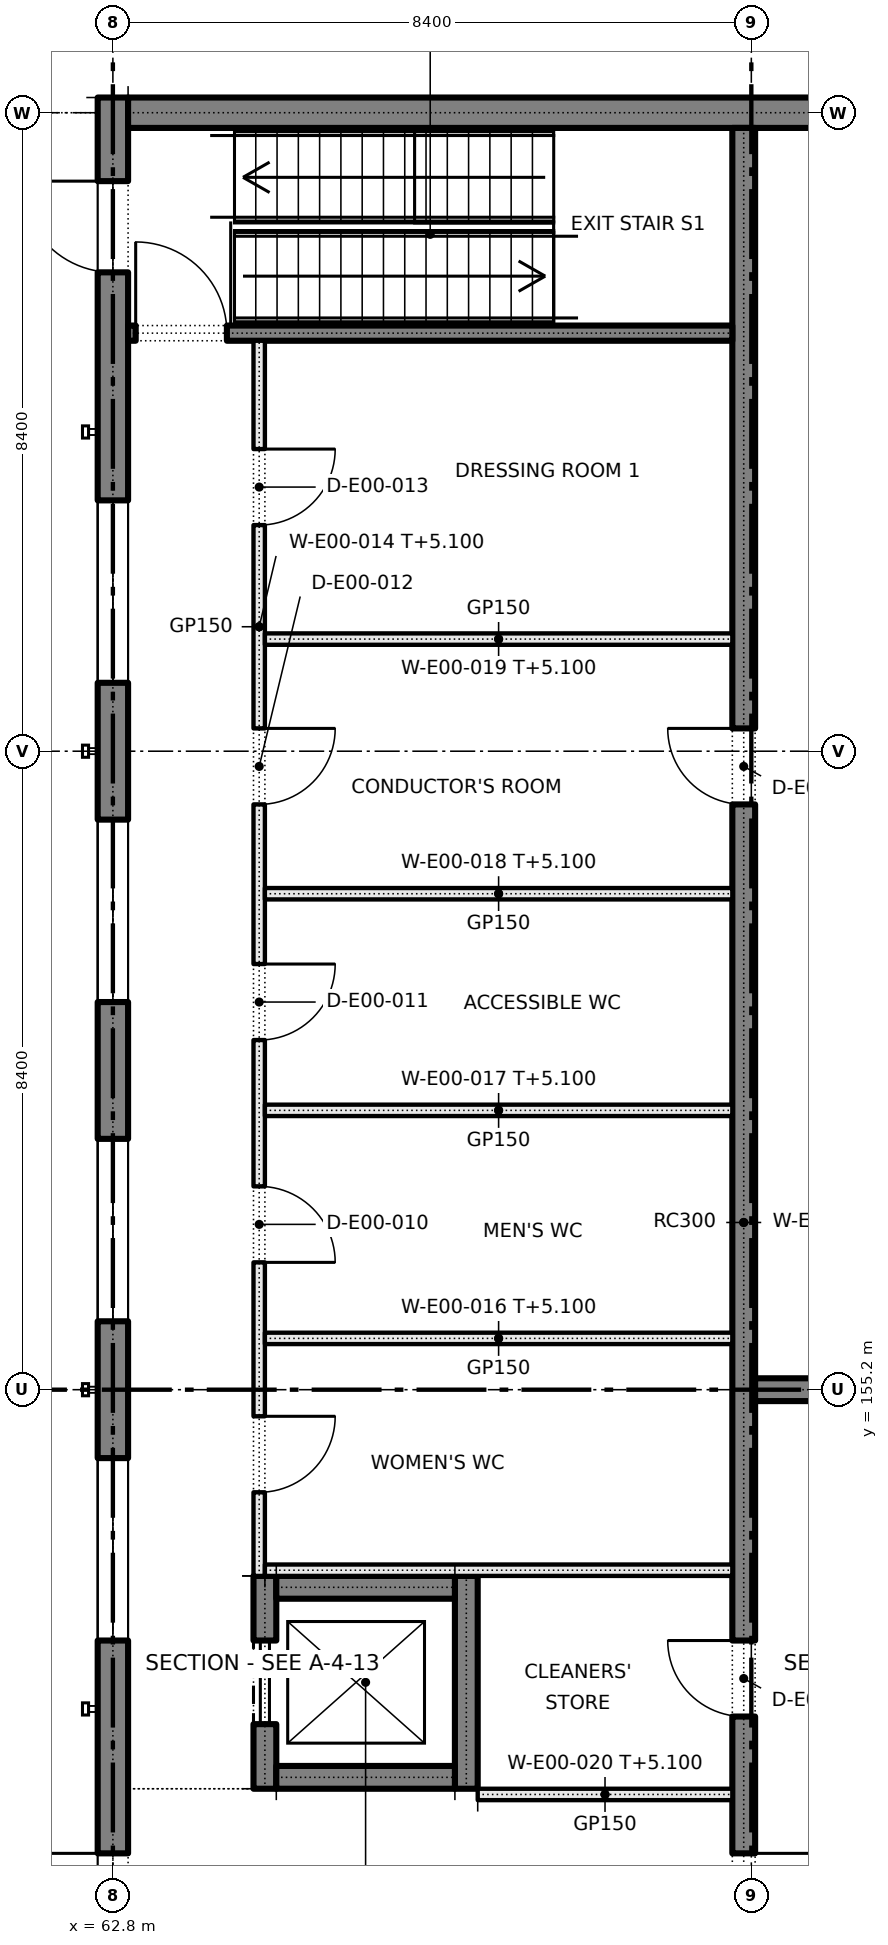
"""IFC4 building model, lengths in metres.
Left out: names, types, materials, properties, quantities, classifications, styles, units other than length and angle.
Written with IfcOpenShell. Run it as: python <this file> out.ifc"""

import sys

from ifc_helpers import new_model, si_unit, direction, frame, frame_2d, origin, place, context, subcontext, project, spatial, rectangle, extrude, element, fill, save


model = new_model("IFC4")
c1 = context("Model", 3, precision=1e-05, world=origin(), true_north=direction((0.0, 1.0)))
c2 = subcontext(c1, "Body", "Model", "MODEL_VIEW")
j1 = project(units=[si_unit("LENGTHUNIT", "METRE"), si_unit("PLANEANGLEUNIT", "RADIAN")], contexts=[c1])
p1 = place(None, origin())
s1 = spatial("IfcSite", under=j1, at=p1, CompositionType="ELEMENT")
p2 = place(p1, origin())
s2 = spatial("IfcBuilding", under=s1, at=p2, CompositionType="ELEMENT")
p3 = place(p2, origin())
s3 = spatial("IfcBuildingStorey", under=s2, at=p3, CompositionType="ELEMENT", Elevation=0.0)
p4 = place(p3, frame((62.8, 146.6, 0.0), z_axis=(0.0, 0.0, 1.0), x_axis=(0.0, 1.0, 0.0)))
e1 = element("IfcWall", 1, at=p4, inside=s3, PredefinedType="SOLIDWALL", context=c2, shape_type="SweptSolid", body=[
    extrude(rectangle(XDim=25.6, YDim=0.4, at=frame_2d((12.8, 0.0))), origin(), (0.0, 0.0, 1.0), 5.4),
])
p5 = place(p4, frame((23.3, 0.0, 0.0)))
e2 = element("IfcOpeningElement", 2, at=p5, cuts=e1, PredefinedType="OPENING", context=c2, shape_type="SweptSolid", body=[
    extrude(rectangle(XDim=1.2, YDim=2.1, at=frame_2d((0.6, 1.05))), frame((0.0, 0.21, 0.0), z_axis=(0.0, -1.0, 0.0), x_axis=(1.0, 0.0, 0.0)), (0.0, 0.0, 1.0), 0.42),
])
p6 = place(p4, frame((1.3, 0.0, 0.0)))
e3 = element("IfcOpeningElement", 3, at=p6, cuts=e1, PredefinedType="OPENING", context=c2, shape_type="SweptSolid", body=[
    extrude(rectangle(XDim=1.2, YDim=2.1, at=frame_2d((0.6, 1.05))), frame((0.0, 0.21, 0.0), z_axis=(0.0, -1.0, 0.0), x_axis=(1.0, 0.0, 0.0)), (0.0, 0.0, 1.0), 0.42),
])
p7 = place(p4, frame((5.3, 0.0, 0.9)))
e4 = element("IfcOpeningElement", 4, at=p7, cuts=e1, PredefinedType="OPENING", context=c2, shape_type="SweptSolid", body=[
    extrude(rectangle(XDim=2.4, YDim=2.4, at=frame_2d((1.2, 1.2))), frame((0.0, 0.21, 0.0), z_axis=(0.0, -1.0, 0.0), x_axis=(1.0, 0.0, 0.0)), (0.0, 0.0, 1.0), 0.42),
])
p8 = place(p4, frame((9.5, 0.0, 0.9)))
e5 = element("IfcOpeningElement", 5, at=p8, cuts=e1, PredefinedType="OPENING", context=c2, shape_type="SweptSolid", body=[
    extrude(rectangle(XDim=2.4, YDim=2.4, at=frame_2d((1.2, 1.2))), frame((0.0, 0.21, 0.0), z_axis=(0.0, -1.0, 0.0), x_axis=(1.0, 0.0, 0.0)), (0.0, 0.0, 1.0), 0.42),
])
p9 = place(p4, frame((13.7, 0.0, 0.9)))
e6 = element("IfcOpeningElement", 6, at=p9, cuts=e1, PredefinedType="OPENING", context=c2, shape_type="SweptSolid", body=[
    extrude(rectangle(XDim=2.4, YDim=2.4, at=frame_2d((1.2, 1.2))), frame((0.0, 0.21, 0.0), z_axis=(0.0, -1.0, 0.0), x_axis=(1.0, 0.0, 0.0)), (0.0, 0.0, 1.0), 0.42),
])
p10 = place(p4, frame((17.9, 0.0, 0.9)))
e7 = element("IfcOpeningElement", 7, at=p10, cuts=e1, PredefinedType="OPENING", context=c2, shape_type="SweptSolid", body=[
    extrude(rectangle(XDim=2.4, YDim=2.4, at=frame_2d((1.2, 1.2))), frame((0.0, 0.21, 0.0), z_axis=(0.0, -1.0, 0.0), x_axis=(1.0, 0.0, 0.0)), (0.0, 0.0, 1.0), 0.42),
])
p11 = place(p3, frame((63.0, 172.0, 0.0), z_axis=(0.0, 0.0, 1.0), x_axis=(1.0, 0.0, 0.0)))
e8 = element("IfcWall", 8, at=p11, inside=s3, PredefinedType="SOLIDWALL", context=c2, shape_type="SweptSolid", body=[
    extrude(rectangle(XDim=24.8, YDim=0.4, at=frame_2d((12.4, 0.0))), origin(), (0.0, 0.0, 1.0), 5.4),
])
p12 = place(p11, frame((9.1, 0.0, 0.9)))
e9 = element("IfcOpeningElement", 9, at=p12, cuts=e8, PredefinedType="OPENING", context=c2, shape_type="SweptSolid", body=[
    extrude(rectangle(XDim=2.4, YDim=2.4, at=frame_2d((1.2, 1.2))), frame((0.0, 0.21, 0.0), z_axis=(0.0, -1.0, 0.0), x_axis=(1.0, 0.0, 0.0)), (0.0, 0.0, 1.0), 0.42),
])
p13 = place(p11, frame((13.3, 0.0, 0.9)))
e10 = element("IfcOpeningElement", 10, at=p13, cuts=e8, PredefinedType="OPENING", context=c2, shape_type="SweptSolid", body=[
    extrude(rectangle(XDim=2.4, YDim=2.4, at=frame_2d((1.2, 1.2))), frame((0.0, 0.21, 0.0), z_axis=(0.0, -1.0, 0.0), x_axis=(1.0, 0.0, 0.0)), (0.0, 0.0, 1.0), 0.42),
])
p14 = place(p11, frame((17.5, 0.0, 0.9)))
e11 = element("IfcOpeningElement", 11, at=p14, cuts=e8, PredefinedType="OPENING", context=c2, shape_type="SweptSolid", body=[
    extrude(rectangle(XDim=2.4, YDim=2.4, at=frame_2d((1.2, 1.2))), frame((0.0, 0.21, 0.0), z_axis=(0.0, -1.0, 0.0), x_axis=(1.0, 0.0, 0.0)), (0.0, 0.0, 1.0), 0.42),
])
p15 = place(p11, frame((21.7, 0.0, 0.9)))
e12 = element("IfcOpeningElement", 12, at=p15, cuts=e8, PredefinedType="OPENING", context=c2, shape_type="SweptSolid", body=[
    extrude(rectangle(XDim=2.4, YDim=2.4, at=frame_2d((1.2, 1.2))), frame((0.0, 0.21, 0.0), z_axis=(0.0, -1.0, 0.0), x_axis=(1.0, 0.0, 0.0)), (0.0, 0.0, 1.0), 0.42),
])
p16 = place(p3, frame((71.1, 147.0, 0.0), z_axis=(0.0, 0.0, 1.0), x_axis=(0.0, 1.0, 0.0)))
e13 = element("IfcWall", 13, at=p16, inside=s3, PredefinedType="SOLIDWALL", context=c2, shape_type="SweptSolid", body=[
    extrude(rectangle(XDim=24.8, YDim=0.3, at=frame_2d((12.4, 0.0))), origin(), (0.0, 0.0, 1.0), 5.4),
])
p17 = place(p16, frame((0.9, 0.0, 0.0)))
e14 = element("IfcOpeningElement", 14, at=p17, cuts=e13, PredefinedType="OPENING", context=c2, shape_type="SweptSolid", body=[
    extrude(rectangle(XDim=1.2, YDim=2.1, at=frame_2d((0.6, 1.05))), frame((0.0, 0.16, 0.0), z_axis=(0.0, -1.0, 0.0), x_axis=(1.0, 0.0, 0.0)), (0.0, 0.0, 1.0), 0.32),
])
p18 = place(p16, frame((3.9, 0.0, 0.0)))
e15 = element("IfcOpeningElement", 15, at=p18, cuts=e13, PredefinedType="OPENING", context=c2, shape_type="SweptSolid", body=[
    extrude(rectangle(XDim=1.0, YDim=2.1, at=frame_2d((0.5, 1.05))), frame((0.0, 0.16, 0.0), z_axis=(0.0, -1.0, 0.0), x_axis=(1.0, 0.0, 0.0)), (0.0, 0.0, 1.0), 0.32),
])
p19 = place(p16, frame((15.9, 0.0, 0.0)))
e16 = element("IfcOpeningElement", 16, at=p19, cuts=e13, PredefinedType="OPENING", context=c2, shape_type="SweptSolid", body=[
    extrude(rectangle(XDim=1.0, YDim=2.1, at=frame_2d((0.5, 1.05))), frame((0.0, 0.16, 0.0), z_axis=(0.0, -1.0, 0.0), x_axis=(1.0, 0.0, 0.0)), (0.0, 0.0, 1.0), 0.32),
])
p20 = place(p3, frame((71.25, 155.2, 0.0), z_axis=(0.0, 0.0, 1.0), x_axis=(1.0, 0.0, 0.0)))
e17 = element("IfcWall", 17, at=p20, inside=s3, PredefinedType="SOLIDWALL", context=c2, shape_type="SweptSolid", body=[
    extrude(rectangle(XDim=16.55, YDim=0.3, at=frame_2d((8.275, 0.0))), origin(), (0.0, 0.0, 1.0), 5.4),
])
p21 = place(p20, frame((2.95, 0.0, 0.0)))
e18 = element("IfcOpeningElement", 18, at=p21, cuts=e17, PredefinedType="OPENING", context=c2, shape_type="SweptSolid", body=[
    extrude(rectangle(XDim=2.4, YDim=2.1, at=frame_2d((1.2, 1.05))), frame((0.0, 0.16, 0.0), z_axis=(0.0, -1.0, 0.0), x_axis=(1.0, 0.0, 0.0)), (0.0, 0.0, 1.0), 0.32),
])
p22 = place(p20, frame((9.85, 0.0, 0.0)))
e19 = element("IfcOpeningElement", 19, at=p22, cuts=e17, PredefinedType="OPENING", context=c2, shape_type="SweptSolid", body=[
    extrude(rectangle(XDim=2.4, YDim=2.1, at=frame_2d((1.2, 1.05))), frame((0.0, 0.16, 0.0), z_axis=(0.0, -1.0, 0.0), x_axis=(1.0, 0.0, 0.0)), (0.0, 0.0, 1.0), 0.32),
])
p23 = place(p3, frame((63.0, 169.1, 0.0), z_axis=(0.0, 0.0, 1.0), x_axis=(1.0, 0.0, 0.0)))
e20 = element("IfcWall", 20, at=p23, inside=s3, PredefinedType="SOLIDWALL", context=c2, shape_type="SweptSolid", body=[
    extrude(rectangle(XDim=7.95, YDim=0.2, at=frame_2d((3.975, 0.0))), origin(), (0.0, 0.0, 1.0), 5.4),
])
p24 = place(p23, frame((0.1, 0.0, 0.0)))
e21 = element("IfcOpeningElement", 21, at=p24, cuts=e20, PredefinedType="OPENING", context=c2, shape_type="SweptSolid", body=[
    extrude(rectangle(XDim=1.2, YDim=2.1, at=frame_2d((0.6, 1.05))), frame((0.0, 0.11, 0.0), z_axis=(0.0, -1.0, 0.0), x_axis=(1.0, 0.0, 0.0)), (0.0, 0.0, 1.0), 0.22),
])
p25 = place(p3, frame((64.8, 149.95, 0.0), z_axis=(0.0, 0.0, 1.0), x_axis=(0.0, 1.0, 0.0)))
e22 = element("IfcWall", 22, at=p25, inside=s3, PredefinedType="SOLIDWALL", context=c2, shape_type="SweptSolid", body=[
    extrude(rectangle(XDim=2.8, YDim=0.3, at=frame_2d((1.4, 0.0))), origin(), (0.0, 0.0, 1.0), 5.4),
])
p26 = place(p25, frame((0.85, 0.0, 0.0)))
e23 = element("IfcOpeningElement", 23, at=p26, cuts=e22, PredefinedType="OPENING", context=c2, shape_type="SweptSolid", body=[
    extrude(rectangle(XDim=1.1, YDim=2.1, at=frame_2d((0.55, 1.05))), frame((0.0, 0.16, 0.0), z_axis=(0.0, -1.0, 0.0), x_axis=(1.0, 0.0, 0.0)), (0.0, 0.0, 1.0), 0.32),
])
p27 = place(p3, frame((67.45, 149.95, 0.0), z_axis=(0.0, 0.0, 1.0), x_axis=(0.0, 1.0, 0.0)))
e24 = element("IfcWall", 24, at=p27, inside=s3, PredefinedType="SOLIDWALL", context=c2, shape_type="SweptSolid", body=[
    extrude(rectangle(XDim=2.8, YDim=0.3, at=frame_2d((1.4, 0.0))), origin(), (0.0, 0.0, 1.0), 5.4),
])
for number, where, z_axis, x_axis in (
    (25, (64.95, 150.1, 0.0), (0.0, 0.0, 1.0), (1.0, 0.0, 0.0)),
    (26, (64.95, 152.6, 0.0), (0.0, 0.0, 1.0), (1.0, 0.0, 0.0)),
):
    element("IfcWall", number, at=place(p3, frame(where, z_axis=z_axis, x_axis=x_axis)), inside=s3, PredefinedType="SOLIDWALL", context=c2, shape_type="SweptSolid", body=[
        extrude(rectangle(XDim=2.35, YDim=0.3, at=frame_2d((1.175, 0.0))), origin(), (0.0, 0.0, 1.0), 5.4),
    ])
p28 = place(p3, frame((64.725, 152.75, 0.0), z_axis=(0.0, 0.0, 1.0), x_axis=(0.0, 1.0, 0.0)))
e27 = element("IfcWall", 27, at=p28, inside=s3, PredefinedType="PARTITIONING", context=c2, shape_type="SweptSolid", body=[
    extrude(rectangle(XDim=16.25, YDim=0.15, at=frame_2d((8.125, 0.0))), origin(), (0.0, 0.0, 1.0), 5.1),
])
p29 = place(p28, frame((1.1, 0.0, 0.0)))
e28 = element("IfcOpeningElement", 28, at=p29, cuts=e27, PredefinedType="OPENING", context=c2, shape_type="SweptSolid", body=[
    extrude(rectangle(XDim=1.0, YDim=2.1, at=frame_2d((0.5, 1.05))), frame((0.0, 0.085, 0.0), z_axis=(0.0, -1.0, 0.0), x_axis=(1.0, 0.0, 0.0)), (0.0, 0.0, 1.0), 0.17),
])
p30 = place(p28, frame((4.125, 0.0, 0.0)))
e29 = element("IfcOpeningElement", 29, at=p30, cuts=e27, PredefinedType="OPENING", context=c2, shape_type="SweptSolid", body=[
    extrude(rectangle(XDim=1.0, YDim=2.1, at=frame_2d((0.5, 1.05))), frame((0.0, 0.085, 0.0), z_axis=(0.0, -1.0, 0.0), x_axis=(1.0, 0.0, 0.0)), (0.0, 0.0, 1.0), 0.17),
])
p31 = place(p28, frame((7.05, 0.0, 0.0)))
e30 = element("IfcOpeningElement", 30, at=p31, cuts=e27, PredefinedType="OPENING", context=c2, shape_type="SweptSolid", body=[
    extrude(rectangle(XDim=1.0, YDim=2.1, at=frame_2d((0.5, 1.05))), frame((0.0, 0.085, 0.0), z_axis=(0.0, -1.0, 0.0), x_axis=(1.0, 0.0, 0.0)), (0.0, 0.0, 1.0), 0.17),
])
p32 = place(p28, frame((10.15, 0.0, 0.0)))
e31 = element("IfcOpeningElement", 31, at=p32, cuts=e27, PredefinedType="OPENING", context=c2, shape_type="SweptSolid", body=[
    extrude(rectangle(XDim=1.0, YDim=2.1, at=frame_2d((0.5, 1.05))), frame((0.0, 0.085, 0.0), z_axis=(0.0, -1.0, 0.0), x_axis=(1.0, 0.0, 0.0)), (0.0, 0.0, 1.0), 0.17),
])
p33 = place(p28, frame((13.825, 0.0, 0.0)))
e32 = element("IfcOpeningElement", 32, at=p33, cuts=e27, PredefinedType="OPENING", context=c2, shape_type="SweptSolid", body=[
    extrude(rectangle(XDim=1.0, YDim=2.1, at=frame_2d((0.5, 1.05))), frame((0.0, 0.085, 0.0), z_axis=(0.0, -1.0, 0.0), x_axis=(1.0, 0.0, 0.0)), (0.0, 0.0, 1.0), 0.17),
])
for number, where, z_axis, x_axis in (
    (33, (64.8, 152.825, 0.0), (0.0, 0.0, 1.0), (1.0, 0.0, 0.0)),
    (34, (64.8, 155.875, 0.0), (0.0, 0.0, 1.0), (1.0, 0.0, 0.0)),
    (35, (64.8, 158.875, 0.0), (0.0, 0.0, 1.0), (1.0, 0.0, 0.0)),
    (36, (64.8, 161.725, 0.0), (0.0, 0.0, 1.0), (1.0, 0.0, 0.0)),
    (37, (64.8, 165.075, 0.0), (0.0, 0.0, 1.0), (1.0, 0.0, 0.0)),
):
    element("IfcWall", number, at=place(p3, frame(where, z_axis=z_axis, x_axis=x_axis)), inside=s3, PredefinedType="PARTITIONING", context=c2, shape_type="SweptSolid", body=[
        extrude(rectangle(XDim=6.15, YDim=0.15, at=frame_2d((3.075, 0.0))), origin(), (0.0, 0.0, 1.0), 5.1),
    ])
p34 = place(p3, frame((67.6, 149.875, 0.0), z_axis=(0.0, 0.0, 1.0), x_axis=(1.0, 0.0, 0.0)))
e38 = element("IfcWall", 38, at=p34, inside=s3, PredefinedType="PARTITIONING", context=c2, shape_type="SweptSolid", body=[
    extrude(rectangle(XDim=3.35, YDim=0.15, at=frame_2d((1.675, 0.0))), origin(), (0.0, 0.0, 1.0), 5.1),
])
p35 = place(p26, origin())
e39 = element("IfcDoor", 39, at=p35, inside=s3, OperationType="SLIDING_TO_LEFT", PredefinedType="DOOR", context=c2, shape_type="SweptSolid", body=[
    extrude(rectangle(XDim=1.1, YDim=2.1, at=frame_2d((0.55, 1.05))), frame((0.0, 0.025, 0.0), z_axis=(0.0, -1.0, 0.0), x_axis=(1.0, 0.0, 0.0)), (0.0, 0.0, 1.0), 0.05),
])
fill(e23, e39)
p36 = place(p5, origin())
e40 = element("IfcDoor", 40, at=p36, inside=s3, OperationType="SINGLE_SWING_RIGHT", PredefinedType="DOOR", context=c2, shape_type="SweptSolid", body=[
    extrude(rectangle(XDim=1.2, YDim=2.1, at=frame_2d((0.6, 1.05))), frame((0.0, 0.025, 0.0), z_axis=(0.0, -1.0, 0.0), x_axis=(1.0, 0.0, 0.0)), (0.0, 0.0, 1.0), 0.05),
])
fill(e2, e40)
p37 = place(p6, origin())
e41 = element("IfcDoor", 41, at=p37, inside=s3, OperationType="SINGLE_SWING_RIGHT", PredefinedType="DOOR", context=c2, shape_type="SweptSolid", body=[
    extrude(rectangle(XDim=1.2, YDim=2.1, at=frame_2d((0.6, 1.05))), frame((0.0, 0.025, 0.0), z_axis=(0.0, -1.0, 0.0), x_axis=(1.0, 0.0, 0.0)), (0.0, 0.0, 1.0), 0.05),
])
fill(e3, e41)
p38 = place(p7, origin())
e42 = element("IfcWindow", 42, at=p38, inside=s3, PartitioningType="SINGLE_PANEL", PredefinedType="WINDOW", context=c2, shape_type="SweptSolid", body=[
    extrude(rectangle(XDim=2.4, YDim=2.4, at=frame_2d((1.2, 1.2))), frame((0.0, 0.03, 0.0), z_axis=(0.0, -1.0, 0.0), x_axis=(1.0, 0.0, 0.0)), (0.0, 0.0, 1.0), 0.06),
])
fill(e4, e42)
p39 = place(p8, origin())
e43 = element("IfcWindow", 43, at=p39, inside=s3, PartitioningType="SINGLE_PANEL", PredefinedType="WINDOW", context=c2, shape_type="SweptSolid", body=[
    extrude(rectangle(XDim=2.4, YDim=2.4, at=frame_2d((1.2, 1.2))), frame((0.0, 0.03, 0.0), z_axis=(0.0, -1.0, 0.0), x_axis=(1.0, 0.0, 0.0)), (0.0, 0.0, 1.0), 0.06),
])
fill(e5, e43)
p40 = place(p9, origin())
e44 = element("IfcWindow", 44, at=p40, inside=s3, PartitioningType="SINGLE_PANEL", PredefinedType="WINDOW", context=c2, shape_type="SweptSolid", body=[
    extrude(rectangle(XDim=2.4, YDim=2.4, at=frame_2d((1.2, 1.2))), frame((0.0, 0.03, 0.0), z_axis=(0.0, -1.0, 0.0), x_axis=(1.0, 0.0, 0.0)), (0.0, 0.0, 1.0), 0.06),
])
fill(e6, e44)
p41 = place(p10, origin())
e45 = element("IfcWindow", 45, at=p41, inside=s3, PartitioningType="SINGLE_PANEL", PredefinedType="WINDOW", context=c2, shape_type="SweptSolid", body=[
    extrude(rectangle(XDim=2.4, YDim=2.4, at=frame_2d((1.2, 1.2))), frame((0.0, 0.03, 0.0), z_axis=(0.0, -1.0, 0.0), x_axis=(1.0, 0.0, 0.0)), (0.0, 0.0, 1.0), 0.06),
])
fill(e7, e45)
p42 = place(p29, frame((1.0, 0.0, 0.0), z_axis=(0.0, 0.0, 1.0), x_axis=(-1.0, 0.0, 0.0)))
e46 = element("IfcDoor", 46, at=p42, inside=s3, OperationType="SINGLE_SWING_LEFT", PredefinedType="DOOR", context=c2, shape_type="SweptSolid", body=[
    extrude(rectangle(XDim=1.0, YDim=2.1, at=frame_2d((0.5, 1.05))), frame((0.0, 0.025, 0.0), z_axis=(0.0, -1.0, 0.0), x_axis=(1.0, 0.0, 0.0)), (0.0, 0.0, 1.0), 0.05),
])
fill(e28, e46)
p43 = place(p30, frame((1.0, 0.0, 0.0), z_axis=(0.0, 0.0, 1.0), x_axis=(-1.0, 0.0, 0.0)))
e47 = element("IfcDoor", 47, at=p43, inside=s3, OperationType="SINGLE_SWING_RIGHT", PredefinedType="DOOR", context=c2, shape_type="SweptSolid", body=[
    extrude(rectangle(XDim=1.0, YDim=2.1, at=frame_2d((0.5, 1.05))), frame((0.0, 0.025, 0.0), z_axis=(0.0, -1.0, 0.0), x_axis=(1.0, 0.0, 0.0)), (0.0, 0.0, 1.0), 0.05),
])
fill(e29, e47)
p44 = place(p31, frame((1.0, 0.0, 0.0), z_axis=(0.0, 0.0, 1.0), x_axis=(-1.0, 0.0, 0.0)))
e48 = element("IfcDoor", 48, at=p44, inside=s3, OperationType="SINGLE_SWING_LEFT", PredefinedType="DOOR", context=c2, shape_type="SweptSolid", body=[
    extrude(rectangle(XDim=1.0, YDim=2.1, at=frame_2d((0.5, 1.05))), frame((0.0, 0.025, 0.0), z_axis=(0.0, -1.0, 0.0), x_axis=(1.0, 0.0, 0.0)), (0.0, 0.0, 1.0), 0.05),
])
fill(e30, e48)
p45 = place(p32, frame((1.0, 0.0, 0.0), z_axis=(0.0, 0.0, 1.0), x_axis=(-1.0, 0.0, 0.0)))
e49 = element("IfcDoor", 49, at=p45, inside=s3, OperationType="SINGLE_SWING_LEFT", PredefinedType="DOOR", context=c2, shape_type="SweptSolid", body=[
    extrude(rectangle(XDim=1.0, YDim=2.1, at=frame_2d((0.5, 1.05))), frame((0.0, 0.025, 0.0), z_axis=(0.0, -1.0, 0.0), x_axis=(1.0, 0.0, 0.0)), (0.0, 0.0, 1.0), 0.05),
])
fill(e31, e49)
p46 = place(p33, frame((1.0, 0.0, 0.0), z_axis=(0.0, 0.0, 1.0), x_axis=(-1.0, 0.0, 0.0)))
e50 = element("IfcDoor", 50, at=p46, inside=s3, OperationType="SINGLE_SWING_LEFT", PredefinedType="DOOR", context=c2, shape_type="SweptSolid", body=[
    extrude(rectangle(XDim=1.0, YDim=2.1, at=frame_2d((0.5, 1.05))), frame((0.0, 0.025, 0.0), z_axis=(0.0, -1.0, 0.0), x_axis=(1.0, 0.0, 0.0)), (0.0, 0.0, 1.0), 0.05),
])
fill(e32, e50)
p47 = place(p17, frame((1.2, 0.0, 0.0), z_axis=(0.0, 0.0, 1.0), x_axis=(-1.0, 0.0, 0.0)))
e51 = element("IfcDoor", 51, at=p47, inside=s3, OperationType="SINGLE_SWING_LEFT", PredefinedType="DOOR", context=c2, shape_type="SweptSolid", body=[
    extrude(rectangle(XDim=1.2, YDim=2.1, at=frame_2d((0.6, 1.05))), frame((0.0, 0.025, 0.0), z_axis=(0.0, -1.0, 0.0), x_axis=(1.0, 0.0, 0.0)), (0.0, 0.0, 1.0), 0.05),
])
fill(e14, e51)
p48 = place(p24, origin())
e52 = element("IfcDoor", 52, at=p48, inside=s3, OperationType="SINGLE_SWING_LEFT", PredefinedType="DOOR", context=c2, shape_type="SweptSolid", body=[
    extrude(rectangle(XDim=1.2, YDim=2.1, at=frame_2d((0.6, 1.05))), frame((0.0, 0.025, 0.0), z_axis=(0.0, -1.0, 0.0), x_axis=(1.0, 0.0, 0.0)), (0.0, 0.0, 1.0), 0.05),
])
fill(e21, e52)
p49 = place(p18, origin())
e53 = element("IfcDoor", 53, at=p49, inside=s3, OperationType="SINGLE_SWING_RIGHT", PredefinedType="DOOR", context=c2, shape_type="SweptSolid", body=[
    extrude(rectangle(XDim=1.0, YDim=2.1, at=frame_2d((0.5, 1.05))), frame((0.0, 0.025, 0.0), z_axis=(0.0, -1.0, 0.0), x_axis=(1.0, 0.0, 0.0)), (0.0, 0.0, 1.0), 0.05),
])
fill(e15, e53)
p50 = place(p19, origin())
e54 = element("IfcDoor", 54, at=p50, inside=s3, OperationType="SINGLE_SWING_RIGHT", PredefinedType="DOOR", context=c2, shape_type="SweptSolid", body=[
    extrude(rectangle(XDim=1.0, YDim=2.1, at=frame_2d((0.5, 1.05))), frame((0.0, 0.025, 0.0), z_axis=(0.0, -1.0, 0.0), x_axis=(1.0, 0.0, 0.0)), (0.0, 0.0, 1.0), 0.05),
])
fill(e16, e54)
save(model, sys.argv[1])
